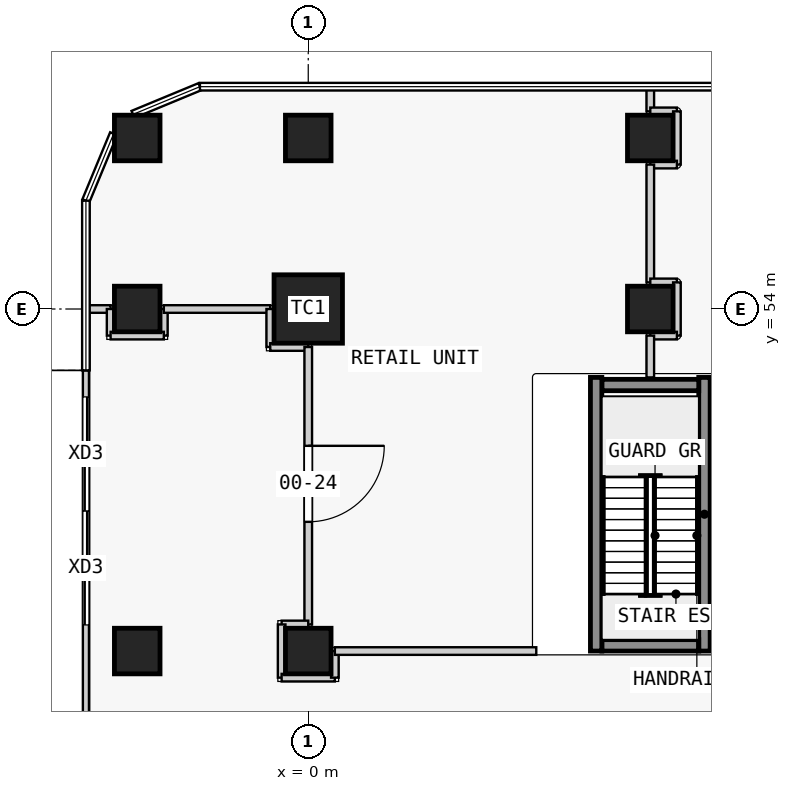
"""IFC4 building model, lengths in metres.
Left out: names, types, materials, properties, quantities, classifications, styles, units other than length and angle.
Written with IfcOpenShell. Run it as: python <this file> out.ifc"""

import sys

from ifc_helpers import new_model, si_unit, direction, frame, frame_2d, origin, origin_2d, place, context, subcontext, project, spatial, rectangle, extrude, element, fill, save


model = new_model("IFC4")
c1 = context("Model", 3, precision=1e-05, world=origin(), true_north=direction((0.0, 1.0)))
c2 = subcontext(c1, "Body", "Model", "MODEL_VIEW")
j1 = project(units=[si_unit("LENGTHUNIT", "METRE"), si_unit("PLANEANGLEUNIT", "RADIAN")], contexts=[c1])
p1 = place(None, origin())
s1 = spatial("IfcSite", under=j1, at=p1, CompositionType="ELEMENT")
p2 = place(p1, origin())
s2 = spatial("IfcBuilding", under=s1, at=p2, CompositionType="ELEMENT")
p3 = place(p2, origin())
s3 = spatial("IfcBuildingStorey", under=s2, at=p3, CompositionType="ELEMENT", Elevation=0.0)
for number, where, z_axis, x_axis in (
    (1, (-4.5, 45.0, 0.0), (0.0, 0.0, 1.0), (1.0, 0.0, 0.0)),
    (2, (-4.5, 54.0, 0.0), (0.0, 0.0, 1.0), (1.0, 0.0, 0.0)),
    (3, (-4.5, 58.5, 0.0), (0.0, 0.0, 1.0), (1.0, 0.0, 0.0)),
    (4, (0.0, 45.0, 0.0), (0.0, 0.0, 1.0), (1.0, 0.0, 0.0)),
):
    element("IfcColumn", number, at=place(p3, frame(where, z_axis=z_axis, x_axis=x_axis)), inside=s3, PredefinedType="COLUMN", context=c2, shape_type="SweptSolid", body=[
        extrude(rectangle(XDim=1.2, YDim=1.2, at=origin_2d()), origin(), (0.0, 0.0, 1.0), 8.0),
    ])
p4 = place(p3, frame((0.0, 54.0, 0.0), z_axis=(0.0, 0.0, 1.0), x_axis=(1.0, 0.0, 0.0)))
e5 = element("IfcColumn", 5, at=p4, inside=s3, PredefinedType="COLUMN", context=c2, shape_type="SweptSolid", body=[
    extrude(rectangle(XDim=1.8, YDim=1.8, at=origin_2d()), origin(), (0.0, 0.0, 1.0), 8.0),
])
for number, where, z_axis, x_axis in (
    (6, (0.0, 58.5, 0.0), (0.0, 0.0, 1.0), (1.0, 0.0, 0.0)),
    (7, (9.0, 54.0, 0.0), (0.0, 0.0, 1.0), (1.0, 0.0, 0.0)),
    (8, (9.0, 58.5, 0.0), (0.0, 0.0, 1.0), (1.0, 0.0, 0.0)),
):
    element("IfcColumn", number, at=place(p3, frame(where, z_axis=z_axis, x_axis=x_axis)), inside=s3, PredefinedType="COLUMN", context=c2, shape_type="SweptSolid", body=[
        extrude(rectangle(XDim=1.2, YDim=1.2, at=origin_2d()), origin(), (0.0, 0.0, 1.0), 8.0),
    ])
for number, where, z_axis, x_axis in (
    (9, (7.725, 45.15, 0.0), (0.0, 0.0, 1.0), (1.0, 0.0, 0.0)),
    (10, (7.725, 52.0, 0.0), (0.0, 0.0, 1.0), (1.0, 0.0, 0.0)),
):
    element("IfcWall", number, at=place(p3, frame(where, z_axis=z_axis, x_axis=x_axis)), inside=s3, PredefinedType="SHEAR", context=c2, shape_type="SweptSolid", body=[
        extrude(rectangle(XDim=2.55, YDim=0.3, at=frame_2d((1.275, 0.0))), origin(), (0.0, 0.0, 1.0), 8.0),
    ])
for number, where, z_axis, x_axis in (
    (11, (7.575, 45.0, 0.0), (0.0, 0.0, 1.0), (0.0, 1.0, 0.0)),
    (12, (10.425, 45.0, 0.0), (0.0, 0.0, 1.0), (0.0, 1.0, 0.0)),
):
    element("IfcWall", number, at=place(p3, frame(where, z_axis=z_axis, x_axis=x_axis)), inside=s3, PredefinedType="SHEAR", context=c2, shape_type="SweptSolid", body=[
        extrude(rectangle(XDim=7.2, YDim=0.3, at=frame_2d((3.6, 0.0))), origin(), (0.0, 0.0, 1.0), 8.0),
    ])
p5 = place(p3, frame((-5.85, 38.99, 0.0), z_axis=(0.0, 0.0, 1.0), x_axis=(0.0, 1.0, 0.0)))
e13 = element("IfcWall", 13, at=p5, inside=s3, PredefinedType="STANDARD", context=c2, shape_type="SweptSolid", body=[
    extrude(rectangle(XDim=13.395, YDim=0.16, at=frame_2d((6.698, 0.0))), origin(), (0.0, 0.0, 1.0), 7.65),
])
p6 = place(p5, frame((6.698, 0.0, 0.0)))
e14 = element("IfcOpeningElement", 14, at=p6, cuts=e13, PredefinedType="OPENING", context=c2, shape_type="SweptSolid", body=[
    extrude(rectangle(XDim=3.0, YDim=3.0, at=frame_2d((1.5, 1.5))), frame((0.0, 0.09, 0.0), z_axis=(0.0, -1.0, 0.0), x_axis=(1.0, 0.0, 0.0)), (0.0, 0.0, 1.0), 0.18),
])
p7 = place(p5, frame((9.698, 0.0, 0.0)))
e15 = element("IfcOpeningElement", 15, at=p7, cuts=e13, PredefinedType="OPENING", context=c2, shape_type="SweptSolid", body=[
    extrude(rectangle(XDim=3.0, YDim=3.0, at=frame_2d((1.5, 1.5))), frame((0.0, 0.09, 0.0), z_axis=(0.0, -1.0, 0.0), x_axis=(1.0, 0.0, 0.0)), (0.0, 0.0, 1.0), 0.18),
])
p8 = place(p3, frame((-3.8, 53.3, 0.0), z_axis=(0.0, 0.0, 1.0), x_axis=(0.0, 1.0, 0.0)))
e16 = element("IfcWall", 16, at=p8, inside=s3, PredefinedType="PARTITIONING", context=c2, shape_type="SweptSolid", body=[
    extrude(rectangle(XDim=0.7, YDim=0.2, at=frame_2d((0.35, 0.0))), origin(), (0.0, 0.0, 1.0), 6.95),
])
p9 = place(p3, frame((-3.8, 54.0, 0.0), z_axis=(0.0, 0.0, 1.0), x_axis=(1.0, 0.0, 0.0)))
e17 = element("IfcWall", 17, at=p9, inside=s3, PredefinedType="PARTITIONING", context=c2, shape_type="SweptSolid", body=[
    extrude(rectangle(XDim=2.8, YDim=0.2, at=frame_2d((1.4, 0.0))), origin(), (0.0, 0.0, 1.0), 6.95),
])
for number, where, z_axis, x_axis in (
    (18, (-1.0, 54.0, 0.0), (0.0, 0.0, 1.0), (0.0, -1.0, 0.0)),
    (19, (-1.0, 53.0, 0.0), (0.0, 0.0, 1.0), (1.0, 0.0, 0.0)),
):
    element("IfcWall", number, at=place(p3, frame(where, z_axis=z_axis, x_axis=x_axis)), inside=s3, PredefinedType="PARTITIONING", context=c2, shape_type="SweptSolid", body=[
        extrude(rectangle(XDim=1.0, YDim=0.2, at=frame_2d((0.5, 0.0))), origin(), (0.0, 0.0, 1.0), 6.95),
    ])
p10 = place(p3, frame((0.0, 53.0, 0.0), z_axis=(0.0, 0.0, 1.0), x_axis=(0.0, -1.0, 0.0)))
e20 = element("IfcWall", 20, at=p10, inside=s3, PredefinedType="PARTITIONING", context=c2, shape_type="SweptSolid", body=[
    extrude(rectangle(XDim=7.3, YDim=0.2, at=frame_2d((3.65, 0.0))), origin(), (0.0, 0.0, 1.0), 6.95),
])
p11 = place(p10, frame((2.6, 0.0, 0.0)))
e21 = element("IfcOpeningElement", 21, at=p11, cuts=e20, PredefinedType="OPENING", context=c2, shape_type="SweptSolid", body=[
    extrude(rectangle(XDim=2.0, YDim=2.4, at=frame_2d((1.0, 1.2))), frame((0.0, 0.11, 0.0), z_axis=(0.0, -1.0, 0.0), x_axis=(1.0, 0.0, 0.0)), (0.0, 0.0, 1.0), 0.22),
])
p12 = place(p3, frame((0.0, 45.7, 0.0), z_axis=(0.0, 0.0, 1.0), x_axis=(-1.0, 0.0, 0.0)))
e22 = element("IfcWall", 22, at=p12, inside=s3, PredefinedType="PARTITIONING", context=c2, shape_type="SweptSolid", body=[
    extrude(rectangle(XDim=0.7, YDim=0.2, at=frame_2d((0.35, 0.0))), origin(), (0.0, 0.0, 1.0), 6.95),
])
for number, where, z_axis, x_axis in (
    (23, (-0.7, 45.7, 0.0), (0.0, 0.0, 1.0), (0.0, -1.0, 0.0)),
    (24, (-0.7, 44.3, 0.0), (0.0, 0.0, 1.0), (1.0, 0.0, 0.0)),
):
    element("IfcWall", number, at=place(p3, frame(where, z_axis=z_axis, x_axis=x_axis)), inside=s3, PredefinedType="PARTITIONING", context=c2, shape_type="SweptSolid", body=[
        extrude(rectangle(XDim=1.4, YDim=0.2, at=frame_2d((0.7, 0.0))), origin(), (0.0, 0.0, 1.0), 6.95),
    ])
p13 = place(p3, frame((0.7, 44.3, 0.0), z_axis=(0.0, 0.0, 1.0), x_axis=(0.0, 1.0, 0.0)))
e25 = element("IfcWall", 25, at=p13, inside=s3, PredefinedType="PARTITIONING", context=c2, shape_type="SweptSolid", body=[
    extrude(rectangle(XDim=0.7, YDim=0.2, at=frame_2d((0.35, 0.0))), origin(), (0.0, 0.0, 1.0), 7.65),
])
p14 = place(p3, frame((0.7, 45.0, 0.0), z_axis=(0.0, 0.0, 1.0), x_axis=(1.0, 0.0, 0.0)))
e26 = element("IfcWall", 26, at=p14, inside=s3, PredefinedType="PARTITIONING", context=c2, shape_type="SweptSolid", body=[
    extrude(rectangle(XDim=5.3, YDim=0.2, at=frame_2d((2.65, 0.0))), origin(), (0.0, 0.0, 1.0), 7.65),
])
p15 = place(p3, frame((9.0, 59.85, 0.0), z_axis=(0.0, 0.0, 1.0), x_axis=(0.0, -1.0, 0.0)))
e27 = element("IfcWall", 27, at=p15, inside=s3, PredefinedType="PARTITIONING", context=c2, shape_type="SweptSolid", body=[
    extrude(rectangle(XDim=0.65, YDim=0.2, at=frame_2d((0.325, 0.0))), origin(), (0.0, 0.0, 1.0), 7.65),
])
p16 = place(p3, frame((9.0, 59.2, 0.0), z_axis=(0.0, 0.0, 1.0), x_axis=(1.0, 0.0, 0.0)))
e28 = element("IfcWall", 28, at=p16, inside=s3, PredefinedType="PARTITIONING", context=c2, shape_type="SweptSolid", body=[
    extrude(rectangle(XDim=0.7, YDim=0.2, at=frame_2d((0.35, 0.0))), origin(), (0.0, 0.0, 1.0), 7.65),
])
p17 = place(p3, frame((9.7, 59.2, 0.0), z_axis=(0.0, 0.0, 1.0), x_axis=(0.0, -1.0, 0.0)))
e29 = element("IfcWall", 29, at=p17, inside=s3, PredefinedType="PARTITIONING", context=c2, shape_type="SweptSolid", body=[
    extrude(rectangle(XDim=1.4, YDim=0.2, at=frame_2d((0.7, 0.0))), origin(), (0.0, 0.0, 1.0), 6.95),
])
p18 = place(p3, frame((9.7, 57.8, 0.0), z_axis=(0.0, 0.0, 1.0), x_axis=(-1.0, 0.0, 0.0)))
e30 = element("IfcWall", 30, at=p18, inside=s3, PredefinedType="PARTITIONING", context=c2, shape_type="SweptSolid", body=[
    extrude(rectangle(XDim=0.7, YDim=0.2, at=frame_2d((0.35, 0.0))), origin(), (0.0, 0.0, 1.0), 6.95),
])
p19 = place(p3, frame((9.0, 57.8, 0.0), z_axis=(0.0, 0.0, 1.0), x_axis=(0.0, -1.0, 0.0)))
e31 = element("IfcWall", 31, at=p19, inside=s3, PredefinedType="PARTITIONING", context=c2, shape_type="SweptSolid", body=[
    extrude(rectangle(XDim=3.1, YDim=0.2, at=frame_2d((1.55, 0.0))), origin(), (0.0, 0.0, 1.0), 6.95),
])
p20 = place(p3, frame((9.0, 54.7, 0.0), z_axis=(0.0, 0.0, 1.0), x_axis=(1.0, 0.0, 0.0)))
e32 = element("IfcWall", 32, at=p20, inside=s3, PredefinedType="PARTITIONING", context=c2, shape_type="SweptSolid", body=[
    extrude(rectangle(XDim=0.7, YDim=0.2, at=frame_2d((0.35, 0.0))), origin(), (0.0, 0.0, 1.0), 6.95),
])
p21 = place(p3, frame((9.7, 54.7, 0.0), z_axis=(0.0, 0.0, 1.0), x_axis=(0.0, -1.0, 0.0)))
e33 = element("IfcWall", 33, at=p21, inside=s3, PredefinedType="PARTITIONING", context=c2, shape_type="SweptSolid", body=[
    extrude(rectangle(XDim=1.4, YDim=0.2, at=frame_2d((0.7, 0.0))), origin(), (0.0, 0.0, 1.0), 6.95),
])
p22 = place(p3, frame((9.7, 53.3, 0.0), z_axis=(0.0, 0.0, 1.0), x_axis=(-1.0, 0.0, 0.0)))
e34 = element("IfcWall", 34, at=p22, inside=s3, PredefinedType="PARTITIONING", context=c2, shape_type="SweptSolid", body=[
    extrude(rectangle(XDim=0.7, YDim=0.2, at=frame_2d((0.35, 0.0))), origin(), (0.0, 0.0, 1.0), 7.65),
])
p23 = place(p3, frame((9.0, 53.3, 0.0), z_axis=(0.0, 0.0, 1.0), x_axis=(0.0, -1.0, 0.0)))
e35 = element("IfcWall", 35, at=p23, inside=s3, PredefinedType="PARTITIONING", context=c2, shape_type="SweptSolid", body=[
    extrude(rectangle(XDim=1.1, YDim=0.2, at=frame_2d((0.55, 0.0))), origin(), (0.0, 0.0, 1.0), 7.65),
])
p24 = place(p3, frame((-5.85, 54.0, 0.0), z_axis=(0.0, 0.0, 1.0), x_axis=(1.0, 0.0, 0.0)))
e36 = element("IfcWall", 36, at=p24, inside=s3, PredefinedType="PARTITIONING", context=c2, shape_type="SweptSolid", body=[
    extrude(rectangle(XDim=0.65, YDim=0.2, at=frame_2d((0.325, 0.0))), origin(), (0.0, 0.0, 1.0), 7.65),
])
p25 = place(p3, frame((-5.2, 54.0, 0.0), z_axis=(0.0, 0.0, 1.0), x_axis=(0.0, -1.0, 0.0)))
e37 = element("IfcWall", 37, at=p25, inside=s3, PredefinedType="PARTITIONING", context=c2, shape_type="SweptSolid", body=[
    extrude(rectangle(XDim=0.7, YDim=0.2, at=frame_2d((0.35, 0.0))), origin(), (0.0, 0.0, 1.0), 7.65),
])
p26 = place(p3, frame((-5.2, 53.3, 0.0), z_axis=(0.0, 0.0, 1.0), x_axis=(1.0, 0.0, 0.0)))
e38 = element("IfcWall", 38, at=p26, inside=s3, PredefinedType="PARTITIONING", context=c2, shape_type="SweptSolid", body=[
    extrude(rectangle(XDim=1.4, YDim=0.2, at=frame_2d((0.7, 0.0))), origin(), (0.0, 0.0, 1.0), 6.95),
])
p27 = place(p6, origin())
e39 = element("IfcDoor", 39, at=p27, inside=s3, OperationType="SINGLE_SWING_LEFT", PredefinedType="DOOR", context=c2, shape_type="SweptSolid", body=[
    extrude(rectangle(XDim=3.0, YDim=3.0, at=frame_2d((1.5, 1.5))), frame((0.0, 0.025, 0.0), z_axis=(0.0, -1.0, 0.0), x_axis=(1.0, 0.0, 0.0)), (0.0, 0.0, 1.0), 0.05),
])
fill(e14, e39)
p28 = place(p7, origin())
e40 = element("IfcDoor", 40, at=p28, inside=s3, OperationType="SINGLE_SWING_LEFT", PredefinedType="DOOR", context=c2, shape_type="SweptSolid", body=[
    extrude(rectangle(XDim=3.0, YDim=3.0, at=frame_2d((1.5, 1.5))), frame((0.0, 0.025, 0.0), z_axis=(0.0, -1.0, 0.0), x_axis=(1.0, 0.0, 0.0)), (0.0, 0.0, 1.0), 0.05),
])
fill(e15, e40)
p29 = place(p11, origin())
e41 = element("IfcDoor", 41, at=p29, inside=s3, OperationType="SINGLE_SWING_LEFT", PredefinedType="DOOR", context=c2, shape_type="SweptSolid", body=[
    extrude(rectangle(XDim=2.0, YDim=2.4, at=frame_2d((1.0, 1.2))), frame((0.0, 0.025, 0.0), z_axis=(0.0, -1.0, 0.0), x_axis=(1.0, 0.0, 0.0)), (0.0, 0.0, 1.0), 0.05),
])
fill(e21, e41)
save(model, sys.argv[1])
